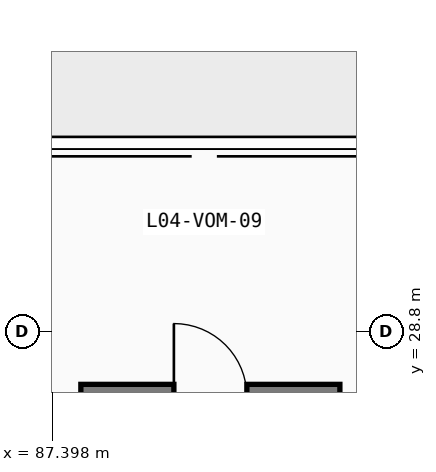
"""IFC4 building model, lengths in metres.
Left out: names, types, materials, properties, quantities, classifications, styles, units other than length and angle.
Written with IfcOpenShell. Run it as: python <this file> out.ifc"""

import sys

from ifc_helpers import new_model, si_unit, direction, frame, frame_2d, origin, place, context, subcontext, project, spatial, rectangle, extrude, element, save


model = new_model("IFC4")
c1 = context("Model", 3, precision=1e-05, world=origin(), true_north=direction((0.0, 1.0)))
c2 = subcontext(c1, "Body", "Model", "MODEL_VIEW")
j1 = project(units=[si_unit("LENGTHUNIT", "METRE"), si_unit("PLANEANGLEUNIT", "RADIAN")], contexts=[c1])
p1 = place(None, origin())
s1 = spatial("IfcSite", under=j1, at=p1, CompositionType="ELEMENT")
p2 = place(p1, origin())
s2 = spatial("IfcBuilding", under=s1, at=p2, CompositionType="ELEMENT")
p3 = place(p2, frame((0.0, 0.0, 18.6)))
s3 = spatial("IfcBuildingStorey", under=s2, at=p3, CompositionType="ELEMENT", Elevation=18.6)
p4 = place(p3, frame((92.13, 27.73, 0.0), z_axis=(0.0, 0.0, 1.0), x_axis=(-1.0, 0.0, 0.0)))
e1 = element("IfcWall", 1, at=p4, inside=s3, PredefinedType="SHEAR", context=c2, shape_type="SweptSolid", body=[
    extrude(rectangle(XDim=4.26, YDim=0.4, at=frame_2d((2.13, 0.0))), origin(), (0.0, 0.0, 1.0), 4.24),
])
p5 = place(p4, frame((2.73, 0.0, 0.0), z_axis=(0.0, 0.0, 1.0), x_axis=(-1.0, 0.0, 0.0)))
e2 = element("IfcOpeningElement", 2, at=p5, cuts=e1, PredefinedType="OPENING", context=c2, shape_type="SweptSolid", body=[
    extrude(rectangle(XDim=1.2, YDim=2.2, at=frame_2d((0.6, 1.1))), frame((0.0, 0.21, 0.0), z_axis=(0.0, -1.0, 0.0), x_axis=(1.0, 0.0, 0.0)), (0.0, 0.0, 1.0), 0.42),
])
save(model, sys.argv[1])
